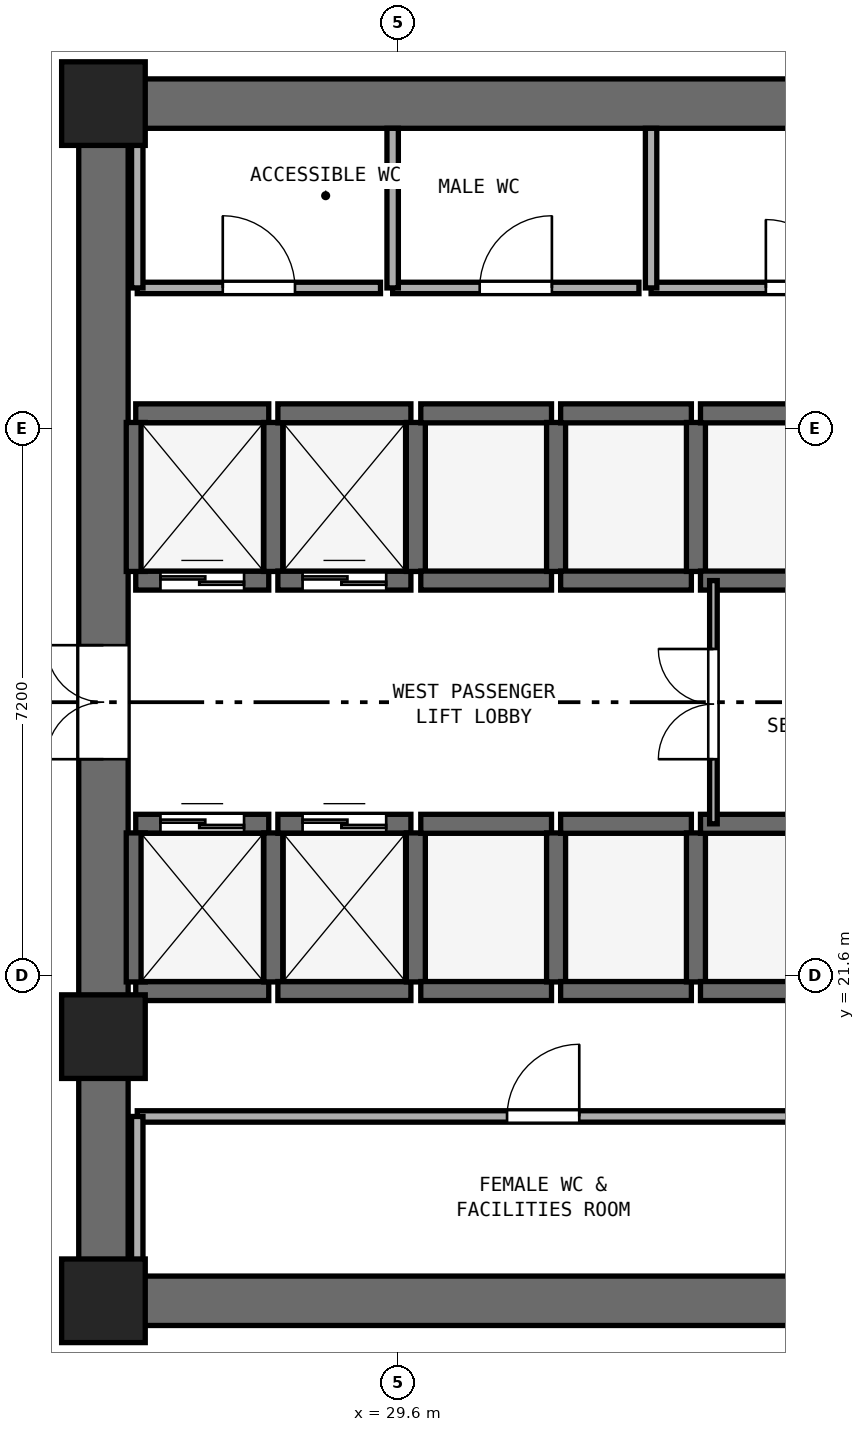
"""IFC4 building model, lengths in metres.
Left out: names, types, materials, properties, quantities, classifications, styles, units other than length and angle.
Written with IfcOpenShell. Run it as: python <this file> out.ifc"""

import sys

from ifc_helpers import new_model, si_unit, direction, frame, frame_2d, origin, origin_2d, place, context, subcontext, project, spatial, rectangle, extrude, element, fill, save


model = new_model("IFC4")
c1 = context("Model", 3, precision=1e-05, world=origin(), true_north=direction((0.0, 1.0)))
c2 = subcontext(c1, "Body", "Model", "MODEL_VIEW")
j1 = project(units=[si_unit("LENGTHUNIT", "METRE"), si_unit("PLANEANGLEUNIT", "RADIAN")], contexts=[c1])
p1 = place(None, origin())
s1 = spatial("IfcSite", under=j1, at=p1, CompositionType="ELEMENT")
p2 = place(p1, origin())
s2 = spatial("IfcBuilding", under=s1, at=p2, CompositionType="ELEMENT")
p3 = place(p2, frame((0.0, 0.0, 66.8)))
s3 = spatial("IfcBuildingStorey", under=s2, at=p3, CompositionType="ELEMENT", Elevation=66.8)
for number, where, z_axis, x_axis in (
    (1, (25.4, 17.325, 0.0), (0.0, 0.0, 1.0), (1.0, 0.0, 0.0)),
    (2, (25.4, 33.075, 0.0), (0.0, 0.0, 1.0), (1.0, 0.0, 0.0)),
):
    element("IfcWall", number, at=place(p3, frame(where, z_axis=z_axis, x_axis=x_axis)), inside=s3, PredefinedType="SHEAR", context=c2, shape_type="SweptSolid", body=[
        extrude(rectangle(XDim=23.2, YDim=0.65, at=frame_2d((11.6, 0.0))), origin(), (0.0, 0.0, 1.0), 3.525),
    ])
p4 = place(p3, frame((25.725, 17.65, 0.0), z_axis=(0.0, 0.0, 1.0), x_axis=(0.0, 1.0, 0.0)))
e3 = element("IfcWall", 3, at=p4, inside=s3, PredefinedType="SHEAR", context=c2, shape_type="SweptSolid", body=[
    extrude(rectangle(XDim=15.1, YDim=0.65, at=frame_2d((7.55, 0.0))), origin(), (0.0, 0.0, 1.0), 3.525),
])
p5 = place(p4, frame((6.8, 0.0, 0.0)))
e4 = element("IfcOpeningElement", 4, at=p5, cuts=e3, PredefinedType="OPENING", context=c2, shape_type="SweptSolid", body=[
    extrude(rectangle(XDim=1.5, YDim=2.15, at=frame_2d((0.75, 1.075))), frame((0.0, 0.335, 0.0), z_axis=(0.0, -1.0, 0.0), x_axis=(1.0, 0.0, 0.0)), (0.0, 0.0, 1.0), 0.67),
])
for number, where, z_axis, x_axis in (
    (5, (25.725, 17.325, 0.0), (0.0, 0.0, 1.0), (1.0, 0.0, 0.0)),
    (6, (25.725, 33.075, 0.0), (0.0, 0.0, 1.0), (1.0, 0.0, 0.0)),
    (7, (25.725, 20.8, 0.0), (0.0, 0.0, 1.0), (1.0, 0.0, 0.0)),
):
    element("IfcColumn", number, at=place(p3, frame(where, z_axis=z_axis, x_axis=x_axis)), inside=s3, PredefinedType="PILASTER", context=c2, shape_type="SweptSolid", body=[
        extrude(rectangle(XDim=1.1, YDim=1.1, at=origin_2d()), origin(), (0.0, 0.0, 1.0), 3.8),
    ])
p6 = place(p3, frame((26.15, 26.8, 0.0), z_axis=(0.0, 0.0, 1.0), x_axis=(1.0, 0.0, 0.0)))
e8 = element("IfcWall", 8, at=p6, inside=s3, PredefinedType="SHEAR", context=c2, shape_type="SweptSolid", body=[
    extrude(rectangle(XDim=1.75, YDim=0.25, at=frame_2d((0.875, 0.0))), origin(), (0.0, 0.0, 1.0), 3.525),
])
p7 = place(p6, frame((0.325, 0.0, 0.0)))
e9 = element("IfcOpeningElement", 9, at=p7, cuts=e8, PredefinedType="OPENING", context=c2, shape_type="SweptSolid", body=[
    extrude(rectangle(XDim=1.1, YDim=2.15, at=frame_2d((0.55, 1.075))), frame((0.0, 0.135, 0.0), z_axis=(0.0, -1.0, 0.0), x_axis=(1.0, 0.0, 0.0)), (0.0, 0.0, 1.0), 0.27),
])
p8 = place(p3, frame((26.15, 29.0, 0.0), z_axis=(0.0, 0.0, 1.0), x_axis=(1.0, 0.0, 0.0)))
e10 = element("IfcWall", 10, at=p8, inside=s3, PredefinedType="SHEAR", context=c2, shape_type="SweptSolid", body=[
    extrude(rectangle(XDim=1.75, YDim=0.25, at=frame_2d((0.875, 0.0))), origin(), (0.0, 0.0, 1.0), 3.525),
])
for number, where, z_axis, x_axis in (
    (11, (26.15, 26.92, 0.0), (0.0, 0.0, 1.0), (0.0, 1.0, 0.0)),
    (12, (27.96, 26.92, 0.0), (0.0, 0.0, 1.0), (0.0, 1.0, 0.0)),
):
    element("IfcWall", number, at=place(p3, frame(where, z_axis=z_axis, x_axis=x_axis)), inside=s3, PredefinedType="SHEAR", context=c2, shape_type="SweptSolid", body=[
        extrude(rectangle(XDim=1.96, YDim=0.25, at=frame_2d((0.98, 0.0))), origin(), (0.0, 0.0, 1.0), 3.525),
    ])
p9 = place(p3, frame((28.02, 26.8, 0.0), z_axis=(0.0, 0.0, 1.0), x_axis=(1.0, 0.0, 0.0)))
e13 = element("IfcWall", 13, at=p9, inside=s3, PredefinedType="SHEAR", context=c2, shape_type="SweptSolid", body=[
    extrude(rectangle(XDim=1.75, YDim=0.25, at=frame_2d((0.875, 0.0))), origin(), (0.0, 0.0, 1.0), 3.525),
])
p10 = place(p9, frame((0.325, 0.0, 0.0)))
e14 = element("IfcOpeningElement", 14, at=p10, cuts=e13, PredefinedType="OPENING", context=c2, shape_type="SweptSolid", body=[
    extrude(rectangle(XDim=1.1, YDim=2.15, at=frame_2d((0.55, 1.075))), frame((0.0, 0.135, 0.0), z_axis=(0.0, -1.0, 0.0), x_axis=(1.0, 0.0, 0.0)), (0.0, 0.0, 1.0), 0.27),
])
p11 = place(p3, frame((28.02, 29.0, 0.0), z_axis=(0.0, 0.0, 1.0), x_axis=(1.0, 0.0, 0.0)))
e15 = element("IfcWall", 15, at=p11, inside=s3, PredefinedType="SHEAR", context=c2, shape_type="SweptSolid", body=[
    extrude(rectangle(XDim=1.75, YDim=0.25, at=frame_2d((0.875, 0.0))), origin(), (0.0, 0.0, 1.0), 3.525),
])
p12 = place(p3, frame((29.835, 26.92, 0.0), z_axis=(0.0, 0.0, 1.0), x_axis=(0.0, 1.0, 0.0)))
e16 = element("IfcWall", 16, at=p12, inside=s3, PredefinedType="SHEAR", context=c2, shape_type="SweptSolid", body=[
    extrude(rectangle(XDim=1.96, YDim=0.25, at=frame_2d((0.98, 0.0))), origin(), (0.0, 0.0, 1.0), 3.525),
])
p13 = place(p3, frame((26.15, 21.4, 0.0), z_axis=(0.0, 0.0, 1.0), x_axis=(1.0, 0.0, 0.0)))
e17 = element("IfcWall", 17, at=p13, inside=s3, PredefinedType="SHEAR", context=c2, shape_type="SweptSolid", body=[
    extrude(rectangle(XDim=1.75, YDim=0.25, at=frame_2d((0.875, 0.0))), origin(), (0.0, 0.0, 1.0), 3.525),
])
p14 = place(p3, frame((26.15, 23.6, 0.0), z_axis=(0.0, 0.0, 1.0), x_axis=(1.0, 0.0, 0.0)))
e18 = element("IfcWall", 18, at=p14, inside=s3, PredefinedType="SHEAR", context=c2, shape_type="SweptSolid", body=[
    extrude(rectangle(XDim=1.75, YDim=0.25, at=frame_2d((0.875, 0.0))), origin(), (0.0, 0.0, 1.0), 3.525),
])
p15 = place(p14, frame((0.325, 0.0, 0.0)))
e19 = element("IfcOpeningElement", 19, at=p15, cuts=e18, PredefinedType="OPENING", context=c2, shape_type="SweptSolid", body=[
    extrude(rectangle(XDim=1.1, YDim=2.15, at=frame_2d((0.55, 1.075))), frame((0.0, 0.135, 0.0), z_axis=(0.0, -1.0, 0.0), x_axis=(1.0, 0.0, 0.0)), (0.0, 0.0, 1.0), 0.27),
])
for number, where, z_axis, x_axis in (
    (20, (26.15, 21.52, 0.0), (0.0, 0.0, 1.0), (0.0, 1.0, 0.0)),
    (21, (27.96, 21.52, 0.0), (0.0, 0.0, 1.0), (0.0, 1.0, 0.0)),
):
    element("IfcWall", number, at=place(p3, frame(where, z_axis=z_axis, x_axis=x_axis)), inside=s3, PredefinedType="SHEAR", context=c2, shape_type="SweptSolid", body=[
        extrude(rectangle(XDim=1.96, YDim=0.25, at=frame_2d((0.98, 0.0))), origin(), (0.0, 0.0, 1.0), 3.525),
    ])
p16 = place(p3, frame((28.02, 21.4, 0.0), z_axis=(0.0, 0.0, 1.0), x_axis=(1.0, 0.0, 0.0)))
e22 = element("IfcWall", 22, at=p16, inside=s3, PredefinedType="SHEAR", context=c2, shape_type="SweptSolid", body=[
    extrude(rectangle(XDim=1.75, YDim=0.25, at=frame_2d((0.875, 0.0))), origin(), (0.0, 0.0, 1.0), 3.525),
])
p17 = place(p3, frame((28.02, 23.6, 0.0), z_axis=(0.0, 0.0, 1.0), x_axis=(1.0, 0.0, 0.0)))
e23 = element("IfcWall", 23, at=p17, inside=s3, PredefinedType="SHEAR", context=c2, shape_type="SweptSolid", body=[
    extrude(rectangle(XDim=1.75, YDim=0.25, at=frame_2d((0.875, 0.0))), origin(), (0.0, 0.0, 1.0), 3.525),
])
p18 = place(p17, frame((0.325, 0.0, 0.0)))
e24 = element("IfcOpeningElement", 24, at=p18, cuts=e23, PredefinedType="OPENING", context=c2, shape_type="SweptSolid", body=[
    extrude(rectangle(XDim=1.1, YDim=2.15, at=frame_2d((0.55, 1.075))), frame((0.0, 0.135, 0.0), z_axis=(0.0, -1.0, 0.0), x_axis=(1.0, 0.0, 0.0)), (0.0, 0.0, 1.0), 0.27),
])
p19 = place(p3, frame((29.835, 21.52, 0.0), z_axis=(0.0, 0.0, 1.0), x_axis=(0.0, 1.0, 0.0)))
e25 = element("IfcWall", 25, at=p19, inside=s3, PredefinedType="SHEAR", context=c2, shape_type="SweptSolid", body=[
    extrude(rectangle(XDim=1.96, YDim=0.25, at=frame_2d((0.98, 0.0))), origin(), (0.0, 0.0, 1.0), 3.525),
])
for number, where, z_axis, x_axis in (
    (26, (29.9, 21.4, 0.0), (0.0, 0.0, 1.0), (1.0, 0.0, 0.0)),
    (27, (29.9, 23.6, 0.0), (0.0, 0.0, 1.0), (1.0, 0.0, 0.0)),
):
    element("IfcWall", number, at=place(p3, frame(where, z_axis=z_axis, x_axis=x_axis)), inside=s3, PredefinedType="SHEAR", context=c2, shape_type="SweptSolid", body=[
        extrude(rectangle(XDim=1.72, YDim=0.25, at=frame_2d((0.86, 0.0))), origin(), (0.0, 0.0, 1.0), 3.525),
    ])
p20 = place(p3, frame((31.68, 21.52, 0.0), z_axis=(0.0, 0.0, 1.0), x_axis=(0.0, 1.0, 0.0)))
e28 = element("IfcWall", 28, at=p20, inside=s3, PredefinedType="SHEAR", context=c2, shape_type="SweptSolid", body=[
    extrude(rectangle(XDim=1.96, YDim=0.25, at=frame_2d((0.98, 0.0))), origin(), (0.0, 0.0, 1.0), 3.525),
])
for number, where, z_axis, x_axis in (
    (29, (31.74, 21.4, 0.0), (0.0, 0.0, 1.0), (1.0, 0.0, 0.0)),
    (30, (31.74, 23.6, 0.0), (0.0, 0.0, 1.0), (1.0, 0.0, 0.0)),
):
    element("IfcWall", number, at=place(p3, frame(where, z_axis=z_axis, x_axis=x_axis)), inside=s3, PredefinedType="SHEAR", context=c2, shape_type="SweptSolid", body=[
        extrude(rectangle(XDim=1.72, YDim=0.25, at=frame_2d((0.86, 0.0))), origin(), (0.0, 0.0, 1.0), 3.525),
    ])
p21 = place(p3, frame((33.52, 21.52, 0.0), z_axis=(0.0, 0.0, 1.0), x_axis=(0.0, 1.0, 0.0)))
e31 = element("IfcWall", 31, at=p21, inside=s3, PredefinedType="SHEAR", context=c2, shape_type="SweptSolid", body=[
    extrude(rectangle(XDim=1.96, YDim=0.25, at=frame_2d((0.98, 0.0))), origin(), (0.0, 0.0, 1.0), 3.525),
])
for number, where, z_axis, x_axis in (
    (32, (33.58, 21.4, 0.0), (0.0, 0.0, 1.0), (1.0, 0.0, 0.0)),
    (33, (33.58, 23.6, 0.0), (0.0, 0.0, 1.0), (1.0, 0.0, 0.0)),
):
    element("IfcWall", number, at=place(p3, frame(where, z_axis=z_axis, x_axis=x_axis)), inside=s3, PredefinedType="SHEAR", context=c2, shape_type="SweptSolid", body=[
        extrude(rectangle(XDim=1.72, YDim=0.25, at=frame_2d((0.86, 0.0))), origin(), (0.0, 0.0, 1.0), 3.525),
    ])
for number, where, z_axis, x_axis in (
    (34, (29.9, 26.8, 0.0), (0.0, 0.0, 1.0), (1.0, 0.0, 0.0)),
    (35, (29.9, 29.0, 0.0), (0.0, 0.0, 1.0), (1.0, 0.0, 0.0)),
):
    element("IfcWall", number, at=place(p3, frame(where, z_axis=z_axis, x_axis=x_axis)), inside=s3, PredefinedType="SHEAR", context=c2, shape_type="SweptSolid", body=[
        extrude(rectangle(XDim=1.72, YDim=0.25, at=frame_2d((0.86, 0.0))), origin(), (0.0, 0.0, 1.0), 3.525),
    ])
p22 = place(p3, frame((31.68, 26.92, 0.0), z_axis=(0.0, 0.0, 1.0), x_axis=(0.0, 1.0, 0.0)))
e36 = element("IfcWall", 36, at=p22, inside=s3, PredefinedType="SHEAR", context=c2, shape_type="SweptSolid", body=[
    extrude(rectangle(XDim=1.96, YDim=0.25, at=frame_2d((0.98, 0.0))), origin(), (0.0, 0.0, 1.0), 3.525),
])
for number, where, z_axis, x_axis in (
    (37, (31.74, 26.8, 0.0), (0.0, 0.0, 1.0), (1.0, 0.0, 0.0)),
    (38, (31.74, 29.0, 0.0), (0.0, 0.0, 1.0), (1.0, 0.0, 0.0)),
):
    element("IfcWall", number, at=place(p3, frame(where, z_axis=z_axis, x_axis=x_axis)), inside=s3, PredefinedType="SHEAR", context=c2, shape_type="SweptSolid", body=[
        extrude(rectangle(XDim=1.72, YDim=0.25, at=frame_2d((0.86, 0.0))), origin(), (0.0, 0.0, 1.0), 3.525),
    ])
p23 = place(p3, frame((33.52, 26.92, 0.0), z_axis=(0.0, 0.0, 1.0), x_axis=(0.0, 1.0, 0.0)))
e39 = element("IfcWall", 39, at=p23, inside=s3, PredefinedType="SHEAR", context=c2, shape_type="SweptSolid", body=[
    extrude(rectangle(XDim=1.96, YDim=0.25, at=frame_2d((0.98, 0.0))), origin(), (0.0, 0.0, 1.0), 3.525),
])
for number, where, z_axis, x_axis in (
    (40, (33.58, 26.8, 0.0), (0.0, 0.0, 1.0), (1.0, 0.0, 0.0)),
    (41, (33.58, 29.0, 0.0), (0.0, 0.0, 1.0), (1.0, 0.0, 0.0)),
):
    element("IfcWall", number, at=place(p3, frame(where, z_axis=z_axis, x_axis=x_axis)), inside=s3, PredefinedType="SHEAR", context=c2, shape_type="SweptSolid", body=[
        extrude(rectangle(XDim=1.72, YDim=0.25, at=frame_2d((0.86, 0.0))), origin(), (0.0, 0.0, 1.0), 3.525),
    ])
p24 = place(p3, frame((26.17, 30.65, 0.0), z_axis=(0.0, 0.0, 1.0), x_axis=(1.0, 0.0, 0.0)))
e42 = element("IfcWall", 42, at=p24, inside=s3, PredefinedType="PARTITIONING", context=c2, shape_type="SweptSolid", body=[
    extrude(rectangle(XDim=3.2, YDim=0.15, at=frame_2d((1.6, 0.0))), origin(), (0.0, 0.0, 1.0), 3.525),
])
p25 = place(p24, frame((1.125, 0.0, 0.0)))
e43 = element("IfcOpeningElement", 43, at=p25, cuts=e42, PredefinedType="OPENING", context=c2, shape_type="SweptSolid", body=[
    extrude(rectangle(XDim=0.95, YDim=2.1, at=frame_2d((0.475, 1.05))), frame((0.0, 0.085, 0.0), z_axis=(0.0, -1.0, 0.0), x_axis=(1.0, 0.0, 0.0)), (0.0, 0.0, 1.0), 0.17),
])
p26 = place(p3, frame((26.17, 30.65, 0.0), z_axis=(0.0, 0.0, 1.0), x_axis=(0.0, 1.0, 0.0)))
e44 = element("IfcWall", 44, at=p26, inside=s3, PredefinedType="PARTITIONING", context=c2, shape_type="SweptSolid", body=[
    extrude(rectangle(XDim=2.1, YDim=0.15, at=frame_2d((1.05, 0.0))), origin(), (0.0, 0.0, 1.0), 3.525),
])
p27 = place(p3, frame((29.53, 30.65, 0.0), z_axis=(0.0, 0.0, 1.0), x_axis=(1.0, 0.0, 0.0)))
e45 = element("IfcWall", 45, at=p27, inside=s3, PredefinedType="PARTITIONING", context=c2, shape_type="SweptSolid", body=[
    extrude(rectangle(XDim=3.24, YDim=0.15, at=frame_2d((1.62, 0.0))), origin(), (0.0, 0.0, 1.0), 3.525),
])
p28 = place(p27, frame((1.145, 0.0, 0.0)))
e46 = element("IfcOpeningElement", 46, at=p28, cuts=e45, PredefinedType="OPENING", context=c2, shape_type="SweptSolid", body=[
    extrude(rectangle(XDim=0.95, YDim=2.1, at=frame_2d((0.475, 1.05))), frame((0.0, 0.085, 0.0), z_axis=(0.0, -1.0, 0.0), x_axis=(1.0, 0.0, 0.0)), (0.0, 0.0, 1.0), 0.17),
])
p29 = place(p3, frame((29.53, 30.65, 0.0), z_axis=(0.0, 0.0, 1.0), x_axis=(0.0, 1.0, 0.0)))
e47 = element("IfcWall", 47, at=p29, inside=s3, PredefinedType="PARTITIONING", context=c2, shape_type="SweptSolid", body=[
    extrude(rectangle(XDim=2.1, YDim=0.15, at=frame_2d((1.05, 0.0))), origin(), (0.0, 0.0, 1.0), 3.525),
])
p30 = place(p3, frame((32.93, 30.65, 0.0), z_axis=(0.0, 0.0, 1.0), x_axis=(1.0, 0.0, 0.0)))
e48 = element("IfcWall", 48, at=p30, inside=s3, PredefinedType="PARTITIONING", context=c2, shape_type="SweptSolid", body=[
    extrude(rectangle(XDim=3.92, YDim=0.15, at=frame_2d((1.96, 0.0))), origin(), (0.0, 0.0, 1.0), 3.525),
])
p31 = place(p30, frame((1.51, 0.0, 0.0)))
e49 = element("IfcOpeningElement", 49, at=p31, cuts=e48, PredefinedType="OPENING", context=c2, shape_type="SweptSolid", body=[
    extrude(rectangle(XDim=0.9, YDim=2.1, at=frame_2d((0.45, 1.05))), frame((0.0, 0.085, 0.0), z_axis=(0.0, -1.0, 0.0), x_axis=(1.0, 0.0, 0.0)), (0.0, 0.0, 1.0), 0.17),
])
p32 = place(p3, frame((32.93, 30.65, 0.0), z_axis=(0.0, 0.0, 1.0), x_axis=(0.0, 1.0, 0.0)))
e50 = element("IfcWall", 50, at=p32, inside=s3, PredefinedType="PARTITIONING", context=c2, shape_type="SweptSolid", body=[
    extrude(rectangle(XDim=2.1, YDim=0.15, at=frame_2d((1.05, 0.0))), origin(), (0.0, 0.0, 1.0), 3.525),
])
p33 = place(p3, frame((26.17, 19.75, 0.0), z_axis=(0.0, 0.0, 1.0), x_axis=(1.0, 0.0, 0.0)))
e51 = element("IfcWall", 51, at=p33, inside=s3, PredefinedType="PARTITIONING", context=c2, shape_type="SweptSolid", body=[
    extrude(rectangle(XDim=10.68, YDim=0.15, at=frame_2d((5.34, 0.0))), origin(), (0.0, 0.0, 1.0), 3.525),
])
p34 = place(p33, frame((4.865, 0.0, 0.0)))
e52 = element("IfcOpeningElement", 52, at=p34, cuts=e51, PredefinedType="OPENING", context=c2, shape_type="SweptSolid", body=[
    extrude(rectangle(XDim=0.95, YDim=2.1, at=frame_2d((0.475, 1.05))), frame((0.0, 0.085, 0.0), z_axis=(0.0, -1.0, 0.0), x_axis=(1.0, 0.0, 0.0)), (0.0, 0.0, 1.0), 0.17),
])
p35 = place(p3, frame((26.17, 17.65, 0.0), z_axis=(0.0, 0.0, 1.0), x_axis=(0.0, 1.0, 0.0)))
e53 = element("IfcWall", 53, at=p35, inside=s3, PredefinedType="PARTITIONING", context=c2, shape_type="SweptSolid", body=[
    extrude(rectangle(XDim=2.1, YDim=0.15, at=frame_2d((1.05, 0.0))), origin(), (0.0, 0.0, 1.0), 3.525),
])
p36 = place(p3, frame((33.75, 23.6, 0.0), z_axis=(0.0, 0.0, 1.0), x_axis=(0.0, 1.0, 0.0)))
e54 = element("IfcWall", 54, at=p36, inside=s3, PredefinedType="PARTITIONING", context=c2, shape_type="SweptSolid", body=[
    extrude(rectangle(XDim=3.2, YDim=0.1, at=frame_2d((1.6, 0.0))), origin(), (0.0, 0.0, 1.0), 3.525),
])
p37 = place(p36, frame((0.85, 0.0, 0.0)))
e55 = element("IfcOpeningElement", 55, at=p37, cuts=e54, PredefinedType="OPENING", context=c2, shape_type="SweptSolid", body=[
    extrude(rectangle(XDim=1.45, YDim=2.12, at=frame_2d((0.725, 1.06))), frame((0.0, 0.06, 0.0), z_axis=(0.0, -1.0, 0.0), x_axis=(1.0, 0.0, 0.0)), (0.0, 0.0, 1.0), 0.12),
])
p38 = place(p7, origin())
e56 = element("IfcDoor", 56, at=p38, inside=s3, OperationType="DOUBLE_DOOR_SLIDING", PredefinedType="DOOR", context=c2, shape_type="SweptSolid", body=[
    extrude(rectangle(XDim=1.1, YDim=2.15, at=frame_2d((0.55, 1.075))), frame((0.0, 0.025, 0.0), z_axis=(0.0, -1.0, 0.0), x_axis=(1.0, 0.0, 0.0)), (0.0, 0.0, 1.0), 0.05),
])
fill(e9, e56)
p39 = place(p10, origin())
e57 = element("IfcDoor", 57, at=p39, inside=s3, OperationType="DOUBLE_DOOR_SLIDING", PredefinedType="DOOR", context=c2, shape_type="SweptSolid", body=[
    extrude(rectangle(XDim=1.1, YDim=2.15, at=frame_2d((0.55, 1.075))), frame((0.0, 0.025, 0.0), z_axis=(0.0, -1.0, 0.0), x_axis=(1.0, 0.0, 0.0)), (0.0, 0.0, 1.0), 0.05),
])
fill(e14, e57)
p40 = place(p15, origin())
e58 = element("IfcDoor", 58, at=p40, inside=s3, OperationType="DOUBLE_DOOR_SLIDING", PredefinedType="DOOR", context=c2, shape_type="SweptSolid", body=[
    extrude(rectangle(XDim=1.1, YDim=2.15, at=frame_2d((0.55, 1.075))), frame((0.0, 0.025, 0.0), z_axis=(0.0, -1.0, 0.0), x_axis=(1.0, 0.0, 0.0)), (0.0, 0.0, 1.0), 0.05),
])
fill(e19, e58)
p41 = place(p18, origin())
e59 = element("IfcDoor", 59, at=p41, inside=s3, OperationType="DOUBLE_DOOR_SLIDING", PredefinedType="DOOR", context=c2, shape_type="SweptSolid", body=[
    extrude(rectangle(XDim=1.1, YDim=2.15, at=frame_2d((0.55, 1.075))), frame((0.0, 0.025, 0.0), z_axis=(0.0, -1.0, 0.0), x_axis=(1.0, 0.0, 0.0)), (0.0, 0.0, 1.0), 0.05),
])
fill(e24, e59)
p42 = place(p5, origin())
e60 = element("IfcDoor", 60, at=p42, inside=s3, OperationType="DOUBLE_DOOR_SINGLE_SWING", PredefinedType="DOOR", context=c2, shape_type="SweptSolid", body=[
    extrude(rectangle(XDim=1.5, YDim=2.15, at=frame_2d((0.75, 1.075))), frame((0.0, 0.025, 0.0), z_axis=(0.0, -1.0, 0.0), x_axis=(1.0, 0.0, 0.0)), (0.0, 0.0, 1.0), 0.05),
])
fill(e4, e60)
p43 = place(p25, origin())
e61 = element("IfcDoor", 61, at=p43, inside=s3, OperationType="SINGLE_SWING_LEFT", PredefinedType="DOOR", context=c2, shape_type="SweptSolid", body=[
    extrude(rectangle(XDim=0.95, YDim=2.1, at=frame_2d((0.475, 1.05))), frame((0.0, 0.025, 0.0), z_axis=(0.0, -1.0, 0.0), x_axis=(1.0, 0.0, 0.0)), (0.0, 0.0, 1.0), 0.05),
])
fill(e43, e61)
p44 = place(p28, origin())
e62 = element("IfcDoor", 62, at=p44, inside=s3, OperationType="SINGLE_SWING_RIGHT", PredefinedType="DOOR", context=c2, shape_type="SweptSolid", body=[
    extrude(rectangle(XDim=0.95, YDim=2.1, at=frame_2d((0.475, 1.05))), frame((0.0, 0.025, 0.0), z_axis=(0.0, -1.0, 0.0), x_axis=(1.0, 0.0, 0.0)), (0.0, 0.0, 1.0), 0.05),
])
fill(e46, e62)
p45 = place(p31, origin())
e63 = element("IfcDoor", 63, at=p45, inside=s3, OperationType="SINGLE_SWING_LEFT", PredefinedType="DOOR", context=c2, shape_type="SweptSolid", body=[
    extrude(rectangle(XDim=0.9, YDim=2.1, at=frame_2d((0.45, 1.05))), frame((0.0, 0.025, 0.0), z_axis=(0.0, -1.0, 0.0), x_axis=(1.0, 0.0, 0.0)), (0.0, 0.0, 1.0), 0.05),
])
fill(e49, e63)
p46 = place(p34, origin())
e64 = element("IfcDoor", 64, at=p46, inside=s3, OperationType="SINGLE_SWING_RIGHT", PredefinedType="DOOR", context=c2, shape_type="SweptSolid", body=[
    extrude(rectangle(XDim=0.95, YDim=2.1, at=frame_2d((0.475, 1.05))), frame((0.0, 0.025, 0.0), z_axis=(0.0, -1.0, 0.0), x_axis=(1.0, 0.0, 0.0)), (0.0, 0.0, 1.0), 0.05),
])
fill(e52, e64)
p47 = place(p37, origin())
e65 = element("IfcDoor", 65, at=p47, inside=s3, OperationType="DOUBLE_DOOR_SINGLE_SWING", PredefinedType="DOOR", context=c2, shape_type="SweptSolid", body=[
    extrude(rectangle(XDim=1.45, YDim=2.12, at=frame_2d((0.725, 1.06))), frame((0.0, 0.025, 0.0), z_axis=(0.0, -1.0, 0.0), x_axis=(1.0, 0.0, 0.0)), (0.0, 0.0, 1.0), 0.05),
])
fill(e55, e65)
save(model, sys.argv[1])
